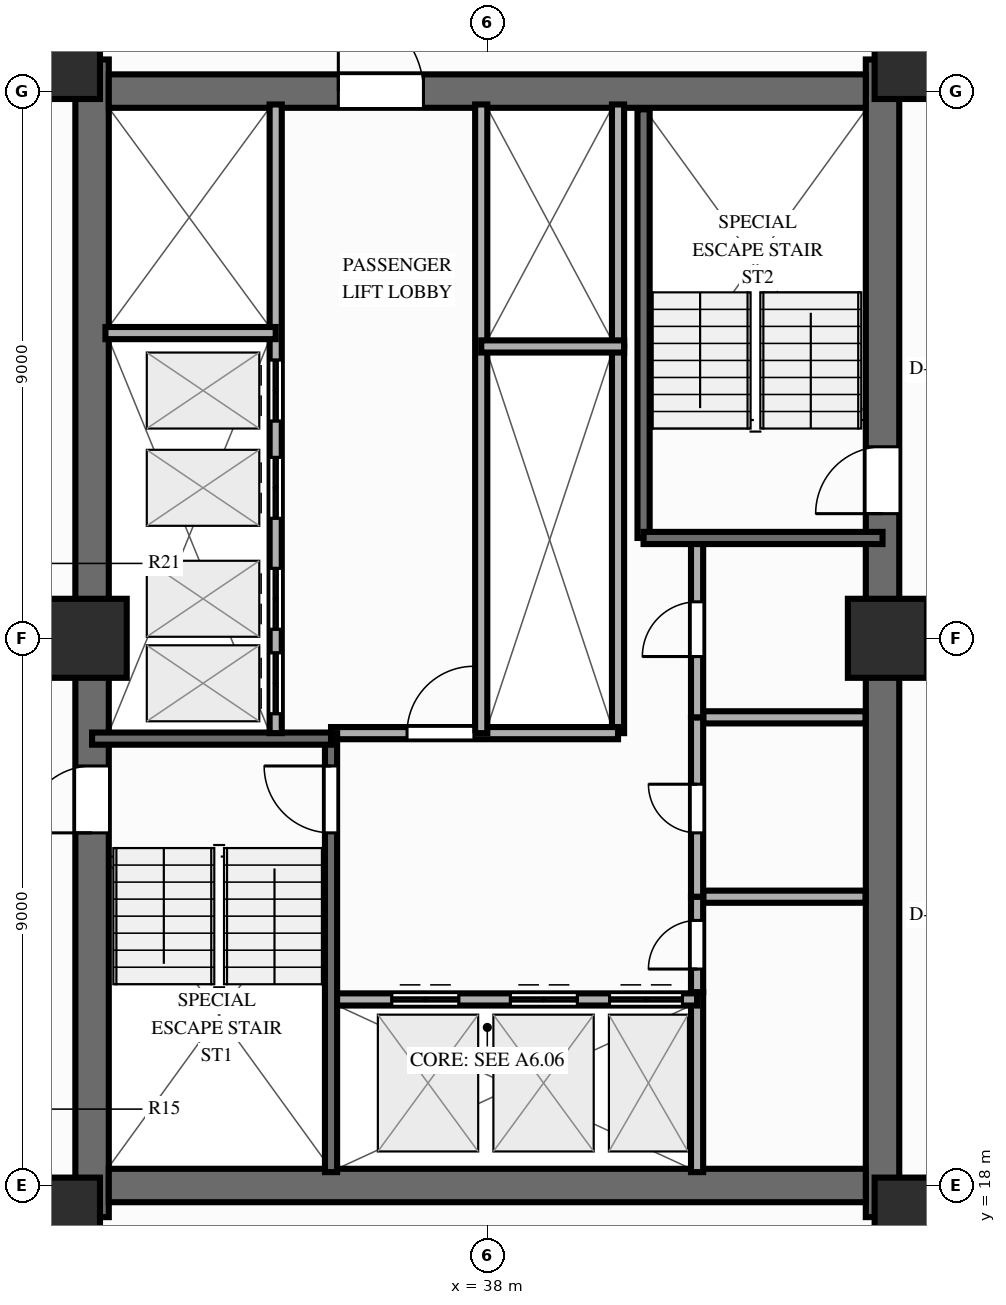
"""IFC4 building model, lengths in metres.
Left out: names, types, materials, properties, quantities, classifications, styles, units other than length and angle.
Written with IfcOpenShell. Run it as: python <this file> out.ifc"""

import sys

from ifc_helpers import new_model, si_unit, direction, frame, frame_2d, origin, origin_2d, place, context, subcontext, project, spatial, rectangle, extrude, source, transform, mapped, element, fill, save


model = new_model("IFC4")
c1 = context("Model", 3, precision=1e-05, world=origin(), true_north=direction((0.0, 1.0)))
c2 = subcontext(c1, "Body", "Model", "MODEL_VIEW")
j1 = project(units=[si_unit("LENGTHUNIT", "METRE"), si_unit("PLANEANGLEUNIT", "RADIAN")], contexts=[c1])
p1 = place(None, origin())
s1 = spatial("IfcSite", under=j1, at=p1, CompositionType="ELEMENT")
p2 = place(p1, origin())
s2 = spatial("IfcBuilding", under=s1, at=p2, CompositionType="ELEMENT")
p3 = place(p2, frame((0.0, 0.0, 77.85)))
s3 = spatial("IfcBuildingStorey", under=s2, at=p3, CompositionType="ELEMENT", Elevation=77.85)
p4 = place(p3, frame((31.5, 17.48, 0.0), z_axis=(0.0, 0.0, 1.0), x_axis=(0.0, 1.0, 0.0)))
e1 = element("IfcWall", 1, at=p4, inside=s3, PredefinedType="SHEAR", context=c2, shape_type="SweptSolid", body=[
    extrude(rectangle(XDim=19.04, YDim=0.55, at=frame_2d((9.52, 0.0))), origin(), (0.0, 0.0, 1.0), 3.0),
])
p5 = place(p4, frame((6.32, 0.0, 0.0)))
e2 = element("IfcOpeningElement", 2, at=p5, cuts=e1, PredefinedType="OPENING", context=c2, shape_type="SweptSolid", body=[
    extrude(rectangle(XDim=1.1, YDim=2.15, at=frame_2d((0.55, 1.075))), frame((0.0, 0.287, 0.0), z_axis=(0.0, -1.0, 0.0), x_axis=(1.0, 0.0, 0.0)), (0.0, 0.0, 1.0), 0.574),
])
p6 = place(p3, frame((44.5, 17.48, 0.0), z_axis=(0.0, 0.0, 1.0), x_axis=(0.0, 1.0, 0.0)))
e3 = element("IfcWall", 3, at=p6, inside=s3, PredefinedType="SHEAR", context=c2, shape_type="SweptSolid", body=[
    extrude(rectangle(XDim=19.04, YDim=0.55, at=frame_2d((9.52, 0.0))), origin(), (0.0, 0.0, 1.0), 3.0),
])
p7 = place(p6, frame((12.67, 0.0, 0.0), z_axis=(0.0, 0.0, 1.0), x_axis=(-1.0, 0.0, 0.0)))
e4 = element("IfcOpeningElement", 4, at=p7, cuts=e3, PredefinedType="OPENING", context=c2, shape_type="SweptSolid", body=[
    extrude(rectangle(XDim=1.1, YDim=2.15, at=frame_2d((0.55, 1.075))), frame((0.0, 0.287, 0.0), z_axis=(0.0, -1.0, 0.0), x_axis=(1.0, 0.0, 0.0)), (0.0, 0.0, 1.0), 0.574),
])
p8 = place(p3, frame((31.775, 18.0, 0.0), z_axis=(0.0, 0.0, 1.0), x_axis=(1.0, 0.0, 0.0)))
e5 = element("IfcWall", 5, at=p8, inside=s3, PredefinedType="SHEAR", context=c2, shape_type="SweptSolid", body=[
    extrude(rectangle(XDim=12.45, YDim=0.55, at=frame_2d((6.225, 0.0))), origin(), (0.0, 0.0, 1.0), 3.0),
])
p9 = place(p3, frame((31.775, 36.0, 0.0), z_axis=(0.0, 0.0, 1.0), x_axis=(1.0, 0.0, 0.0)))
e6 = element("IfcWall", 6, at=p9, inside=s3, PredefinedType="SHEAR", context=c2, shape_type="SweptSolid", body=[
    extrude(rectangle(XDim=12.45, YDim=0.55, at=frame_2d((6.225, 0.0))), origin(), (0.0, 0.0, 1.0), 3.0),
])
p10 = place(p9, frame((5.175, 0.0, 0.0), z_axis=(0.0, 0.0, 1.0), x_axis=(-1.0, 0.0, 0.0)))
e7 = element("IfcOpeningElement", 7, at=p10, cuts=e6, PredefinedType="OPENING", context=c2, shape_type="SweptSolid", body=[
    extrude(rectangle(XDim=1.4, YDim=2.15, at=frame_2d((0.7, 1.075))), frame((0.0, 0.287, 0.0), z_axis=(0.0, -1.0, 0.0), x_axis=(1.0, 0.0, 0.0)), (0.0, 0.0, 1.0), 0.574),
])
m1 = source(origin(), c2, "Body", "SweptSolid", [
    extrude(rectangle(XDim=1.3, YDim=1.3, at=origin_2d()), origin(), (0.0, 0.0, 1.0), 3.0),
])
for number, where, z_axis, x_axis in (
    (8, (30.98, 17.48, 0.0), (0.0, 0.0, 1.0), (1.0, 0.0, 0.0)),
    (9, (45.02, 17.48, 0.0), (0.0, 0.0, 1.0), (1.0, 0.0, 0.0)),
    (10, (30.98, 36.52, 0.0), (0.0, 0.0, 1.0), (1.0, 0.0, 0.0)),
    (11, (45.02, 36.52, 0.0), (0.0, 0.0, 1.0), (1.0, 0.0, 0.0)),
    (12, (31.42, 27.0, 0.0), (0.0, 0.0, 1.0), (1.0, 0.0, 0.0)),
    (13, (44.58, 27.0, 0.0), (0.0, 0.0, 1.0), (1.0, 0.0, 0.0)),
):
    element("IfcColumn", number, at=place(p3, frame(where, z_axis=z_axis, x_axis=x_axis)), inside=s3, PredefinedType="COLUMN", context=c2, shape_type="MappedRepresentation", body=[
        mapped(m1, transform((0.0, 0.0, 0.0), scale=1.0)),
    ])
p11 = place(p3, frame((41.55, 22.75, 0.0), z_axis=(0.0, 0.0, 1.0), x_axis=(1.0, 0.0, 0.0)))
e14 = element("IfcWall", 14, at=p11, inside=s3, PredefinedType="PARTITIONING", context=c2, shape_type="SweptSolid", body=[
    extrude(rectangle(XDim=2.67, YDim=0.2, at=frame_2d((1.335, 0.0))), origin(), (0.0, 0.0, 1.0), 2.79),
])
p12 = place(p3, frame((41.55, 25.7, 0.0), z_axis=(0.0, 0.0, 1.0), x_axis=(1.0, 0.0, 0.0)))
e15 = element("IfcWall", 15, at=p12, inside=s3, PredefinedType="PARTITIONING", context=c2, shape_type="SweptSolid", body=[
    extrude(rectangle(XDim=2.67, YDim=0.2, at=frame_2d((1.335, 0.0))), origin(), (0.0, 0.0, 1.0), 2.14),
])
p13 = place(p3, frame((41.45, 18.22, 0.0), z_axis=(0.0, 0.0, 1.0), x_axis=(0.0, 1.0, 0.0)))
e16 = element("IfcWall", 16, at=p13, inside=s3, PredefinedType="PARTITIONING", context=c2, shape_type="SweptSolid", body=[
    extrude(rectangle(XDim=2.96, YDim=0.2, at=frame_2d((1.48, 0.0))), origin(), (0.0, 0.0, 1.0), 2.79),
])
p14 = place(p3, frame((41.45, 21.18, 0.0), z_axis=(0.0, 0.0, 1.0), x_axis=(0.0, 1.0, 0.0)))
e17 = element("IfcWall", 17, at=p14, inside=s3, PredefinedType="PARTITIONING", context=c2, shape_type="SweptSolid", body=[
    extrude(rectangle(XDim=1.57, YDim=0.2, at=frame_2d((0.785, 0.0))), origin(), (0.0, 0.0, 1.0), 2.79),
])
p15 = place(p14, frame((0.38, 0.0, 0.0)))
e18 = element("IfcOpeningElement", 18, at=p15, cuts=e17, PredefinedType="OPENING", context=c2, shape_type="SweptSolid", body=[
    extrude(rectangle(XDim=0.8, YDim=2.05, at=frame_2d((0.4, 1.025))), frame((0.0, 0.112, 0.0), z_axis=(0.0, -1.0, 0.0), x_axis=(1.0, 0.0, 0.0)), (0.0, 0.0, 1.0), 0.224),
])
p16 = place(p3, frame((41.45, 22.75, 0.0), z_axis=(0.0, 0.0, 1.0), x_axis=(0.0, 1.0, 0.0)))
e19 = element("IfcWall", 19, at=p16, inside=s3, PredefinedType="PARTITIONING", context=c2, shape_type="SweptSolid", body=[
    extrude(rectangle(XDim=2.95, YDim=0.2, at=frame_2d((1.475, 0.0))), origin(), (0.0, 0.0, 1.0), 2.79),
])
p17 = place(p16, frame((1.05, 0.0, 0.0)))
e20 = element("IfcOpeningElement", 20, at=p17, cuts=e19, PredefinedType="OPENING", context=c2, shape_type="SweptSolid", body=[
    extrude(rectangle(XDim=0.8, YDim=2.05, at=frame_2d((0.4, 1.025))), frame((0.0, 0.112, 0.0), z_axis=(0.0, -1.0, 0.0), x_axis=(1.0, 0.0, 0.0)), (0.0, 0.0, 1.0), 0.224),
])
p18 = place(p3, frame((41.45, 25.7, 0.0), z_axis=(0.0, 0.0, 1.0), x_axis=(0.0, 1.0, 0.0)))
e21 = element("IfcWall", 21, at=p18, inside=s3, PredefinedType="PARTITIONING", context=c2, shape_type="SweptSolid", body=[
    extrude(rectangle(XDim=2.9, YDim=0.2, at=frame_2d((1.45, 0.0))), origin(), (0.0, 0.0, 1.0), 2.79),
])
p19 = place(p18, frame((1.0, 0.0, 0.0)))
e22 = element("IfcOpeningElement", 22, at=p19, cuts=e21, PredefinedType="OPENING", context=c2, shape_type="SweptSolid", body=[
    extrude(rectangle(XDim=0.9, YDim=2.1, at=frame_2d((0.45, 1.05))), frame((0.0, 0.112, 0.0), z_axis=(0.0, -1.0, 0.0), x_axis=(1.0, 0.0, 0.0)), (0.0, 0.0, 1.0), 0.224),
])
p20 = place(p3, frame((40.15, 25.44, 0.0), z_axis=(0.0, 0.0, 1.0), x_axis=(0.0, 1.0, 0.0)))
e23 = element("IfcWall", 23, at=p20, inside=s3, PredefinedType="PARTITIONING", context=c2, shape_type="SweptSolid", body=[
    extrude(rectangle(XDim=6.36, YDim=0.2, at=frame_2d((3.18, 0.0))), origin(), (0.0, 0.0, 1.0), 2.79),
])
p21 = place(p3, frame((40.15, 31.8, 0.0), z_axis=(0.0, 0.0, 1.0), x_axis=(0.0, 1.0, 0.0)))
e24 = element("IfcWall", 24, at=p21, inside=s3, PredefinedType="PARTITIONING", context=c2, shape_type="SweptSolid", body=[
    extrude(rectangle(XDim=3.98, YDim=0.2, at=frame_2d((1.99, 0.0))), origin(), (0.0, 0.0, 1.0), 2.79),
])
p22 = place(p3, frame((35.43, 21.06, 0.0), z_axis=(0.0, 0.0, 1.0), x_axis=(1.0, 0.0, 0.0)))
e25 = element("IfcWall", 25, at=p22, inside=s3, PredefinedType="PARTITIONING", context=c2, shape_type="SweptSolid", body=[
    extrude(rectangle(XDim=6.02, YDim=0.2, at=frame_2d((3.01, 0.0))), origin(), (0.0, 0.0, 1.0), 2.79),
])
p23 = place(p22, frame((1.0, 0.0, 0.0)))
e26 = element("IfcOpeningElement", 26, at=p23, cuts=e25, PredefinedType="OPENING", context=c2, shape_type="SweptSolid", body=[
    extrude(rectangle(XDim=1.1, YDim=2.15, at=frame_2d((0.55, 1.075))), frame((0.0, 0.112, 0.0), z_axis=(0.0, -1.0, 0.0), x_axis=(1.0, 0.0, 0.0)), (0.0, 0.0, 1.0), 0.224),
])
p24 = place(p22, frame((2.95, 0.0, 0.0)))
e27 = element("IfcOpeningElement", 27, at=p24, cuts=e25, PredefinedType="OPENING", context=c2, shape_type="SweptSolid", body=[
    extrude(rectangle(XDim=1.1, YDim=2.15, at=frame_2d((0.55, 1.075))), frame((0.0, 0.112, 0.0), z_axis=(0.0, -1.0, 0.0), x_axis=(1.0, 0.0, 0.0)), (0.0, 0.0, 1.0), 0.224),
])
p25 = place(p22, frame((4.58, 0.0, 0.0)))
e28 = element("IfcOpeningElement", 28, at=p25, cuts=e25, PredefinedType="OPENING", context=c2, shape_type="SweptSolid", body=[
    extrude(rectangle(XDim=1.2, YDim=2.15, at=frame_2d((0.6, 1.075))), frame((0.0, 0.112, 0.0), z_axis=(0.0, -1.0, 0.0), x_axis=(1.0, 0.0, 0.0)), (0.0, 0.0, 1.0), 0.224),
])
p26 = place(p3, frame((35.43, 25.44, 0.0), z_axis=(0.0, 0.0, 1.0), x_axis=(1.0, 0.0, 0.0)))
e29 = element("IfcWall", 29, at=p26, inside=s3, PredefinedType="PARTITIONING", context=c2, shape_type="SweptSolid", body=[
    extrude(rectangle(XDim=4.72, YDim=0.2, at=frame_2d((2.36, 0.0))), origin(), (0.0, 0.0, 1.0), 2.79),
])
p27 = place(p26, frame((1.25, 0.0, 0.0)))
e30 = element("IfcOpeningElement", 30, at=p27, cuts=e29, PredefinedType="OPENING", context=c2, shape_type="SweptSolid", body=[
    extrude(rectangle(XDim=1.1, YDim=2.15, at=frame_2d((0.55, 1.075))), frame((0.0, 0.112, 0.0), z_axis=(0.0, -1.0, 0.0), x_axis=(1.0, 0.0, 0.0)), (0.0, 0.0, 1.0), 0.224),
])
p28 = place(p3, frame((35.43, 18.22, 0.0), z_axis=(0.0, 0.0, 1.0), x_axis=(0.0, 1.0, 0.0)))
e31 = element("IfcWall", 31, at=p28, inside=s3, PredefinedType="SOLIDWALL", context=c2, shape_type="SweptSolid", body=[
    extrude(rectangle(XDim=7.22, YDim=0.2, at=frame_2d((3.61, 0.0))), origin(), (0.0, 0.0, 1.0), 2.79),
])
p29 = place(p28, frame((6.68, 0.0, 0.0), z_axis=(0.0, 0.0, 1.0), x_axis=(-1.0, 0.0, 0.0)))
e32 = element("IfcOpeningElement", 32, at=p29, cuts=e31, PredefinedType="OPENING", context=c2, shape_type="SweptSolid", body=[
    extrude(rectangle(XDim=1.1, YDim=2.15, at=frame_2d((0.55, 1.075))), frame((0.0, 0.112, 0.0), z_axis=(0.0, -1.0, 0.0), x_axis=(1.0, 0.0, 0.0)), (0.0, 0.0, 1.0), 0.224),
])
p30 = place(p3, frame((31.5, 25.35, 0.0), z_axis=(0.0, 0.0, 1.0), x_axis=(1.0, 0.0, 0.0)))
e33 = element("IfcWall", 33, at=p30, inside=s3, PredefinedType="SOLIDWALL", context=c2, shape_type="SweptSolid", body=[
    extrude(rectangle(XDim=3.93, YDim=0.2, at=frame_2d((1.965, 0.0))), origin(), (0.0, 0.0, 1.0), 2.79),
])
p31 = place(p3, frame((40.57, 28.65, 0.0), z_axis=(0.0, 0.0, 1.0), x_axis=(0.0, 1.0, 0.0)))
e34 = element("IfcWall", 34, at=p31, inside=s3, PredefinedType="SOLIDWALL", context=c2, shape_type="SweptSolid", body=[
    extrude(rectangle(XDim=7.05, YDim=0.2, at=frame_2d((3.525, 0.0))), origin(), (0.0, 0.0, 1.0), 2.79),
])
p32 = place(p3, frame((40.57, 28.65, 0.0), z_axis=(0.0, 0.0, 1.0), x_axis=(1.0, 0.0, 0.0)))
e35 = element("IfcWall", 35, at=p32, inside=s3, PredefinedType="SOLIDWALL", context=c2, shape_type="SweptSolid", body=[
    extrude(rectangle(XDim=3.93, YDim=0.2, at=frame_2d((1.965, 0.0))), origin(), (0.0, 0.0, 1.0), 2.79),
])
p33 = place(p3, frame((34.52, 25.44, 0.0), z_axis=(0.0, 0.0, 1.0), x_axis=(0.0, 1.0, 0.0)))
e36 = element("IfcWall", 36, at=p33, inside=s3, PredefinedType="PARTITIONING", context=c2, shape_type="SweptSolid", body=[
    extrude(rectangle(XDim=10.34, YDim=0.2, at=frame_2d((5.17, 0.0))), origin(), (0.0, 0.0, 1.0), 2.79),
])
p34 = place(p33, frame((0.32, 0.0, 0.0)))
e37 = element("IfcOpeningElement", 37, at=p34, cuts=e36, PredefinedType="OPENING", context=c2, shape_type="SweptSolid", body=[
    extrude(rectangle(XDim=1.0, YDim=2.15, at=frame_2d((0.5, 1.075))), frame((0.0, 0.112, 0.0), z_axis=(0.0, -1.0, 0.0), x_axis=(1.0, 0.0, 0.0)), (0.0, 0.0, 1.0), 0.224),
])
p35 = place(p33, frame((1.71, 0.0, 0.0)))
e38 = element("IfcOpeningElement", 38, at=p35, cuts=e36, PredefinedType="OPENING", context=c2, shape_type="SweptSolid", body=[
    extrude(rectangle(XDim=1.0, YDim=2.15, at=frame_2d((0.5, 1.075))), frame((0.0, 0.112, 0.0), z_axis=(0.0, -1.0, 0.0), x_axis=(1.0, 0.0, 0.0)), (0.0, 0.0, 1.0), 0.224),
])
p36 = place(p33, frame((3.535, 0.0, 0.0)))
e39 = element("IfcOpeningElement", 39, at=p36, cuts=e36, PredefinedType="OPENING", context=c2, shape_type="SweptSolid", body=[
    extrude(rectangle(XDim=1.0, YDim=2.15, at=frame_2d((0.5, 1.075))), frame((0.0, 0.112, 0.0), z_axis=(0.0, -1.0, 0.0), x_axis=(1.0, 0.0, 0.0)), (0.0, 0.0, 1.0), 0.224),
])
p37 = place(p33, frame((5.135, 0.0, 0.0)))
e40 = element("IfcOpeningElement", 40, at=p37, cuts=e36, PredefinedType="OPENING", context=c2, shape_type="SweptSolid", body=[
    extrude(rectangle(XDim=1.0, YDim=2.15, at=frame_2d((0.5, 1.075))), frame((0.0, 0.112, 0.0), z_axis=(0.0, -1.0, 0.0), x_axis=(1.0, 0.0, 0.0)), (0.0, 0.0, 1.0), 0.224),
])
p38 = place(p3, frame((31.72, 32.02, 0.0), z_axis=(0.0, 0.0, 1.0), x_axis=(1.0, 0.0, 0.0)))
e41 = element("IfcWall", 41, at=p38, inside=s3, PredefinedType="PARTITIONING", context=c2, shape_type="SweptSolid", body=[
    extrude(rectangle(XDim=2.8, YDim=0.2, at=frame_2d((1.4, 0.0))), origin(), (0.0, 0.0, 1.0), 2.79),
])
p39 = place(p3, frame((37.9, 25.44, 0.0), z_axis=(0.0, 0.0, 1.0), x_axis=(0.0, 1.0, 0.0)))
e42 = element("IfcWall", 42, at=p39, inside=s3, PredefinedType="PARTITIONING", context=c2, shape_type="SweptSolid", body=[
    extrude(rectangle(XDim=10.34, YDim=0.2, at=frame_2d((5.17, 0.0))), origin(), (0.0, 0.0, 1.0), 2.79),
])
p40 = place(p3, frame((37.9, 31.8, 0.0), z_axis=(0.0, 0.0, 1.0), x_axis=(1.0, 0.0, 0.0)))
e43 = element("IfcWall", 43, at=p40, inside=s3, PredefinedType="PARTITIONING", context=c2, shape_type="SweptSolid", body=[
    extrude(rectangle(XDim=2.35, YDim=0.2, at=frame_2d((1.175, 0.0))), origin(), (0.0, 0.0, 1.0), 2.79),
])
m2 = source(origin(), c2, "Body", "SweptSolid", [
    extrude(rectangle(XDim=1.1, YDim=2.15, at=frame_2d((0.55, 1.075))), frame((0.0, 0.025, 0.0), z_axis=(0.0, -1.0, 0.0), x_axis=(1.0, 0.0, 0.0)), (0.0, 0.0, 1.0), 0.05),
])
p41 = place(p5, origin())
e44 = element("IfcDoor", 44, at=p41, inside=s3, OperationType="SINGLE_SWING_LEFT", PredefinedType="DOOR", context=c2, shape_type="MappedRepresentation", body=[
    mapped(m2, transform((0.0, 0.0, 0.0), scale=1.0)),
])
fill(e2, e44)
p42 = place(p7, origin())
e45 = element("IfcDoor", 45, at=p42, inside=s3, OperationType="SINGLE_SWING_RIGHT", PredefinedType="DOOR", context=c2, shape_type="MappedRepresentation", body=[
    mapped(m2, transform((0.0, 0.0, 0.0), scale=1.0)),
])
fill(e4, e45)
m3 = source(origin(), c2, "Body", "SweptSolid", [
    extrude(rectangle(XDim=1.4, YDim=2.15, at=frame_2d((0.7, 1.075))), frame((0.0, 0.025, 0.0), z_axis=(0.0, -1.0, 0.0), x_axis=(1.0, 0.0, 0.0)), (0.0, 0.0, 1.0), 0.05),
])
p43 = place(p10, origin())
e46 = element("IfcDoor", 46, at=p43, inside=s3, OperationType="SINGLE_SWING_RIGHT", PredefinedType="DOOR", context=c2, shape_type="MappedRepresentation", body=[
    mapped(m3, transform((0.0, 0.0, 0.0), scale=1.0)),
])
fill(e7, e46)
m4 = source(origin(), c2, "Body", "SweptSolid", [
    extrude(rectangle(XDim=0.8, YDim=2.05, at=frame_2d((0.4, 1.025))), frame((0.0, 0.025, 0.0), z_axis=(0.0, -1.0, 0.0), x_axis=(1.0, 0.0, 0.0)), (0.0, 0.0, 1.0), 0.05),
])
p44 = place(p15, origin())
e47 = element("IfcDoor", 47, at=p44, inside=s3, OperationType="SINGLE_SWING_LEFT", PredefinedType="DOOR", context=c2, shape_type="MappedRepresentation", body=[
    mapped(m4, transform((0.0, 0.0, 0.0), scale=1.0)),
])
fill(e18, e47)
p45 = place(p17, origin())
e48 = element("IfcDoor", 48, at=p45, inside=s3, OperationType="SINGLE_SWING_RIGHT", PredefinedType="DOOR", context=c2, shape_type="MappedRepresentation", body=[
    mapped(m4, transform((0.0, 0.0, 0.0), scale=1.0)),
])
fill(e20, e48)
m5 = source(origin(), c2, "Body", "SweptSolid", [
    extrude(rectangle(XDim=0.9, YDim=2.1, at=frame_2d((0.45, 1.05))), frame((0.0, 0.025, 0.0), z_axis=(0.0, -1.0, 0.0), x_axis=(1.0, 0.0, 0.0)), (0.0, 0.0, 1.0), 0.05),
])
p46 = place(p19, origin())
e49 = element("IfcDoor", 49, at=p46, inside=s3, OperationType="SINGLE_SWING_LEFT", PredefinedType="DOOR", context=c2, shape_type="MappedRepresentation", body=[
    mapped(m5, transform((0.0, 0.0, 0.0), scale=1.0)),
])
fill(e22, e49)
p47 = place(p23, origin())
e50 = element("IfcDoor", 50, at=p47, inside=s3, OperationType="DOUBLE_DOOR_SLIDING", PredefinedType="DOOR", context=c2, shape_type="MappedRepresentation", body=[
    mapped(m2, transform((0.0, 0.0, 0.0), scale=1.0)),
])
fill(e26, e50)
p48 = place(p24, origin())
e51 = element("IfcDoor", 51, at=p48, inside=s3, OperationType="DOUBLE_DOOR_SLIDING", PredefinedType="DOOR", context=c2, shape_type="MappedRepresentation", body=[
    mapped(m2, transform((0.0, 0.0, 0.0), scale=1.0)),
])
fill(e27, e51)
m6 = source(origin(), c2, "Body", "SweptSolid", [
    extrude(rectangle(XDim=1.2, YDim=2.15, at=frame_2d((0.6, 1.075))), frame((0.0, 0.025, 0.0), z_axis=(0.0, -1.0, 0.0), x_axis=(1.0, 0.0, 0.0)), (0.0, 0.0, 1.0), 0.05),
])
p49 = place(p25, origin())
e52 = element("IfcDoor", 52, at=p49, inside=s3, OperationType="DOUBLE_DOOR_SLIDING", PredefinedType="DOOR", context=c2, shape_type="MappedRepresentation", body=[
    mapped(m6, transform((0.0, 0.0, 0.0), scale=1.0)),
])
fill(e28, e52)
p50 = place(p27, origin())
e53 = element("IfcDoor", 53, at=p50, inside=s3, OperationType="SINGLE_SWING_RIGHT", PredefinedType="DOOR", context=c2, shape_type="MappedRepresentation", body=[
    mapped(m2, transform((0.0, 0.0, 0.0), scale=1.0)),
])
fill(e30, e53)
p51 = place(p29, origin())
e54 = element("IfcDoor", 54, at=p51, inside=s3, OperationType="SINGLE_SWING_LEFT", PredefinedType="DOOR", context=c2, shape_type="MappedRepresentation", body=[
    mapped(m2, transform((0.0, 0.0, 0.0), scale=1.0)),
])
fill(e32, e54)
m7 = source(origin(), c2, "Body", "SweptSolid", [
    extrude(rectangle(XDim=1.0, YDim=2.15, at=frame_2d((0.5, 1.075))), frame((0.0, 0.025, 0.0), z_axis=(0.0, -1.0, 0.0), x_axis=(1.0, 0.0, 0.0)), (0.0, 0.0, 1.0), 0.05),
])
p52 = place(p34, origin())
e55 = element("IfcDoor", 55, at=p52, inside=s3, OperationType="DOUBLE_DOOR_SLIDING", PredefinedType="DOOR", context=c2, shape_type="MappedRepresentation", body=[
    mapped(m7, transform((0.0, 0.0, 0.0), scale=1.0)),
])
fill(e37, e55)
p53 = place(p35, origin())
e56 = element("IfcDoor", 56, at=p53, inside=s3, OperationType="DOUBLE_DOOR_SLIDING", PredefinedType="DOOR", context=c2, shape_type="MappedRepresentation", body=[
    mapped(m7, transform((0.0, 0.0, 0.0), scale=1.0)),
])
fill(e38, e56)
p54 = place(p36, origin())
e57 = element("IfcDoor", 57, at=p54, inside=s3, OperationType="DOUBLE_DOOR_SLIDING", PredefinedType="DOOR", context=c2, shape_type="MappedRepresentation", body=[
    mapped(m7, transform((0.0, 0.0, 0.0), scale=1.0)),
])
fill(e39, e57)
p55 = place(p37, origin())
e58 = element("IfcDoor", 58, at=p55, inside=s3, OperationType="DOUBLE_DOOR_SLIDING", PredefinedType="DOOR", context=c2, shape_type="MappedRepresentation", body=[
    mapped(m7, transform((0.0, 0.0, 0.0), scale=1.0)),
])
fill(e40, e58)
save(model, sys.argv[1])
